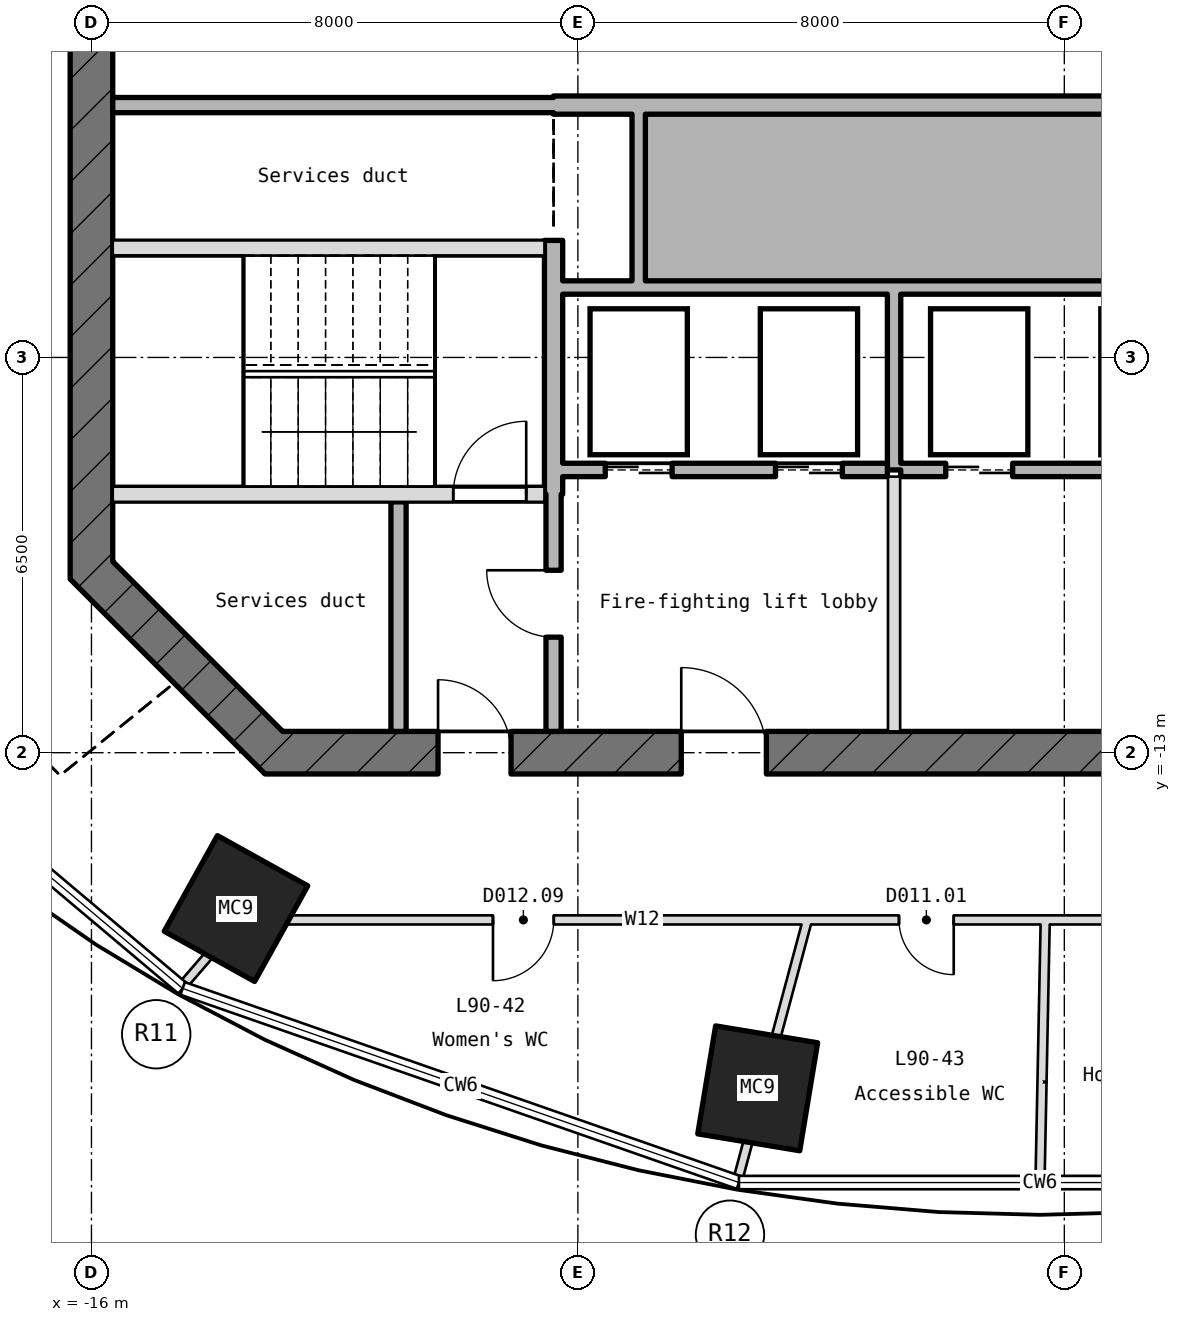
"""IFC4 building model, lengths in metres.
Left out: names, types, materials, properties, quantities, classifications, styles, units other than length and angle.
Written with IfcOpenShell. Run it as: python <this file> out.ifc"""

import sys

from ifc_helpers import new_model, si_unit, direction, frame, frame_2d, origin, origin_2d, place, context, subcontext, project, spatial, rectangle, hollow_rectangle, extrude, element, fill, save


model = new_model("IFC4")
c1 = context("Model", 3, precision=1e-05, world=origin(), true_north=direction((0.0, 1.0)))
c2 = subcontext(c1, "Body", "Model", "MODEL_VIEW")
j1 = project(units=[si_unit("LENGTHUNIT", "METRE"), si_unit("PLANEANGLEUNIT", "RADIAN")], contexts=[c1])
p1 = place(None, origin())
s1 = spatial("IfcSite", under=j1, at=p1, CompositionType="ELEMENT")
p2 = place(p1, origin())
s2 = spatial("IfcBuilding", under=s1, at=p2, CompositionType="ELEMENT")
p3 = place(p2, frame((0.0, 0.0, 396.55)))
s3 = spatial("IfcBuildingStorey", under=s2, at=p3, CompositionType="ELEMENT", Elevation=396.55)
for number, where, z_axis, x_axis in (
    (1, (-13.623, -15.563, -0.25), (0.0, 0.0, 1.0), (-0.874, 0.486, 0.0)),
    (2, (-5.043, -18.52, -0.25), (0.0, 0.0, 1.0), (-0.987, 0.163, 0.0)),
):
    element("IfcColumn", number, at=place(p3, frame(where, z_axis=z_axis, x_axis=x_axis)), inside=s3, PredefinedType="COLUMN", context=c2, shape_type="SweptSolid", body=[
        extrude(hollow_rectangle(XDim=1.7, YDim=1.8, WallThickness=0.05, at=origin_2d()), origin(), (0.0, 0.0, 1.0), 5.4),
    ])
p4 = place(p3, frame((-16.0, 10.145, -0.25), z_axis=(0.0, 0.0, 1.0), x_axis=(0.0, -1.0, 0.0)))
e3 = element("IfcWall", 3, at=p4, inside=s3, PredefinedType="SHEAR", context=c2, shape_type="SweptSolid", body=[
    extrude(rectangle(XDim=20.29, YDim=0.7, at=frame_2d((10.145, 0.0))), origin(), (0.0, 0.0, 1.0), 5.4),
])
p5 = place(p4, frame((8.945, 0.0, 0.25)))
e4 = element("IfcOpeningElement", 4, at=p5, cuts=e3, PredefinedType="OPENING", context=c2, shape_type="SweptSolid", body=[
    extrude(rectangle(XDim=2.4, YDim=2.1, at=frame_2d((1.2, 1.05))), frame((0.0, 0.36, 0.0), z_axis=(0.0, -1.0, 0.0), x_axis=(1.0, 0.0, 0.0)), (0.0, 0.0, 1.0), 0.72),
])
p6 = place(p4, frame((5.545, 0.0, 0.25)))
e5 = element("IfcOpeningElement", 5, at=p6, cuts=e3, PredefinedType="OPENING", context=c2, shape_type="SweptSolid", body=[
    extrude(rectangle(XDim=1.2, YDim=2.1, at=frame_2d((0.6, 1.05))), frame((0.0, 0.36, 0.0), z_axis=(0.0, -1.0, 0.0), x_axis=(1.0, 0.0, 0.0)), (0.0, 0.0, 1.0), 0.72),
])
p7 = place(p3, frame((-16.103, -9.897, -0.25), z_axis=(0.0, 0.0, 1.0), x_axis=(0.707106781187, -0.707106781187, 0.0)))
e6 = element("IfcWall", 6, at=p7, inside=s3, PredefinedType="SHEAR", context=c2, shape_type="SweptSolid", body=[
    extrude(rectangle(XDim=4.533, YDim=0.7, at=frame_2d((2.266, 0.0))), origin(), (0.0, 0.0, 1.0), 5.4),
])
p8 = place(p3, frame((-13.145, -13.0, -0.25), z_axis=(0.0, 0.0, 1.0), x_axis=(1.0, 0.0, 0.0)))
e7 = element("IfcWall", 7, at=p8, inside=s3, PredefinedType="SHEAR", context=c2, shape_type="SweptSolid", body=[
    extrude(rectangle(XDim=26.29, YDim=0.7, at=frame_2d((13.145, 0.0))), origin(), (0.0, 0.0, 1.0), 5.4),
])
p9 = place(p8, frame((2.845, 0.0, 0.25)))
e8 = element("IfcOpeningElement", 8, at=p9, cuts=e7, PredefinedType="OPENING", context=c2, shape_type="SweptSolid", body=[
    extrude(rectangle(XDim=1.2, YDim=2.1, at=frame_2d((0.6, 1.05))), frame((0.0, 0.36, 0.0), z_axis=(0.0, -1.0, 0.0), x_axis=(1.0, 0.0, 0.0)), (0.0, 0.0, 1.0), 0.72),
])
p10 = place(p8, frame((6.845, 0.0, 0.25)))
e9 = element("IfcOpeningElement", 9, at=p10, cuts=e7, PredefinedType="OPENING", context=c2, shape_type="SweptSolid", body=[
    extrude(rectangle(XDim=1.4, YDim=2.1, at=frame_2d((0.7, 1.05))), frame((0.0, 0.36, 0.0), z_axis=(0.0, -1.0, 0.0), x_axis=(1.0, 0.0, 0.0)), (0.0, 0.0, 1.0), 0.72),
])
p11 = place(p8, frame((15.445, 0.0, 0.25)))
e10 = element("IfcOpeningElement", 10, at=p11, cuts=e7, PredefinedType="OPENING", context=c2, shape_type="SweptSolid", body=[
    extrude(rectangle(XDim=1.4, YDim=2.1, at=frame_2d((0.7, 1.05))), frame((0.0, 0.36, 0.0), z_axis=(0.0, -1.0, 0.0), x_axis=(1.0, 0.0, 0.0)), (0.0, 0.0, 1.0), 0.72),
])
p12 = place(p3, frame((-15.65, -8.75, -0.25), z_axis=(0.0, 0.0, 1.0), x_axis=(1.0, 0.0, 0.0)))
e11 = element("IfcWall", 11, at=p12, inside=s3, PredefinedType="SHEAR", context=c2, shape_type="SweptSolid", body=[
    extrude(rectangle(XDim=7.1, YDim=0.25, at=frame_2d((3.55, 0.0))), origin(), (0.0, 0.0, 1.0), 5.4),
])
p13 = place(p12, frame((5.6, 0.0, 0.25)))
e12 = element("IfcOpeningElement", 12, at=p13, cuts=e11, PredefinedType="OPENING", context=c2, shape_type="SweptSolid", body=[
    extrude(rectangle(XDim=1.2, YDim=2.1, at=frame_2d((0.6, 1.05))), frame((0.0, 0.135, 0.0), z_axis=(0.0, -1.0, 0.0), x_axis=(1.0, 0.0, 0.0)), (0.0, 0.0, 1.0), 0.27),
])
p14 = place(p3, frame((-8.25, -8.35, 0.0), z_axis=(0.0, 0.0, 1.0), x_axis=(1.0, 0.0, 0.0)))
e13 = element("IfcWall", 13, at=p14, inside=s3, PredefinedType="STANDARD", context=c2, shape_type="SweptSolid", body=[
    extrude(rectangle(XDim=5.34, YDim=0.22, at=frame_2d((2.67, 0.0))), origin(), (0.0, 0.0, 1.0), 5.15),
])
p15 = place(p14, frame((0.7, 0.0, 0.0)))
e14 = element("IfcOpeningElement", 14, at=p15, cuts=e13, PredefinedType="OPENING", context=c2, shape_type="SweptSolid", body=[
    extrude(rectangle(XDim=1.1, YDim=2.1, at=frame_2d((0.55, 1.05))), frame((0.0, 0.12, 0.0), z_axis=(0.0, -1.0, 0.0), x_axis=(1.0, 0.0, 0.0)), (0.0, 0.0, 1.0), 0.24),
])
p16 = place(p14, frame((3.5, 0.0, 0.0)))
e15 = element("IfcOpeningElement", 15, at=p16, cuts=e13, PredefinedType="OPENING", context=c2, shape_type="SweptSolid", body=[
    extrude(rectangle(XDim=1.1, YDim=2.1, at=frame_2d((0.55, 1.05))), frame((0.0, 0.12, 0.0), z_axis=(0.0, -1.0, 0.0), x_axis=(1.0, 0.0, 0.0)), (0.0, 0.0, 1.0), 0.24),
])
p17 = place(p3, frame((-2.69, -8.35, 0.0), z_axis=(0.0, 0.0, 1.0), x_axis=(1.0, 0.0, 0.0)))
e16 = element("IfcWall", 16, at=p17, inside=s3, PredefinedType="STANDARD", context=c2, shape_type="SweptSolid", body=[
    extrude(rectangle(XDim=10.94, YDim=0.22, at=frame_2d((5.47, 0.0))), origin(), (0.0, 0.0, 1.0), 5.15),
])
p18 = place(p17, frame((0.74, 0.0, 0.0)))
e17 = element("IfcOpeningElement", 17, at=p18, cuts=e16, PredefinedType="OPENING", context=c2, shape_type="SweptSolid", body=[
    extrude(rectangle(XDim=1.1, YDim=2.1, at=frame_2d((0.55, 1.05))), frame((0.0, 0.12, 0.0), z_axis=(0.0, -1.0, 0.0), x_axis=(1.0, 0.0, 0.0)), (0.0, 0.0, 1.0), 0.24),
])
p19 = place(p17, frame((3.54, 0.0, 0.0)))
e18 = element("IfcOpeningElement", 18, at=p19, cuts=e16, PredefinedType="OPENING", context=c2, shape_type="SweptSolid", body=[
    extrude(rectangle(XDim=1.1, YDim=2.1, at=frame_2d((0.55, 1.05))), frame((0.0, 0.12, 0.0), z_axis=(0.0, -1.0, 0.0), x_axis=(1.0, 0.0, 0.0)), (0.0, 0.0, 1.0), 0.24),
])
p20 = place(p3, frame((-8.25, -5.35, 0.0), z_axis=(0.0, 0.0, 1.0), x_axis=(1.0, 0.0, 0.0)))
e19 = element("IfcWall", 19, at=p20, inside=s3, PredefinedType="STANDARD", context=c2, shape_type="SweptSolid", body=[
    extrude(rectangle(XDim=16.5, YDim=0.22, at=frame_2d((8.25, 0.0))), origin(), (0.0, 0.0, 1.0), 5.15),
])
p21 = place(p3, frame((-15.65, -4.7, -0.25), z_axis=(0.0, 0.0, 1.0), x_axis=(1.0, 0.0, 0.0)))
e20 = element("IfcWall", 20, at=p21, inside=s3, PredefinedType="SHEAR", context=c2, shape_type="SweptSolid", body=[
    extrude(rectangle(XDim=7.1, YDim=0.25, at=frame_2d((3.55, 0.0))), origin(), (0.0, 0.0, 1.0), 5.4),
])
p22 = place(p3, frame((-15.65, -2.35, 0.0), z_axis=(0.0, 0.0, 1.0), x_axis=(1.0, 0.0, 0.0)))
e21 = element("IfcWall", 21, at=p22, inside=s3, PredefinedType="STANDARD", context=c2, shape_type="SweptSolid", body=[
    extrude(rectangle(XDim=7.25, YDim=0.25, at=frame_2d((3.625, 0.0))), origin(), (0.0, 0.0, 1.0), 5.15),
])
p23 = place(p3, frame((-8.4, -2.35, -0.25), z_axis=(0.0, 0.0, 1.0), x_axis=(1.0, 0.0, 0.0)))
e22 = element("IfcWall", 22, at=p23, inside=s3, PredefinedType="SHEAR", context=c2, shape_type="SweptSolid", body=[
    extrude(rectangle(XDim=16.8, YDim=0.3, at=frame_2d((8.4, 0.0))), origin(), (0.0, 0.0, 1.0), 5.4),
])
p24 = place(p3, frame((-10.95, -12.65, 0.0), z_axis=(0.0, 0.0, 1.0), x_axis=(0.0, 1.0, 0.0)))
e23 = element("IfcWall", 23, at=p24, inside=s3, PredefinedType="STANDARD", context=c2, shape_type="SweptSolid", body=[
    extrude(rectangle(XDim=3.775, YDim=0.25, at=frame_2d((1.887, 0.0))), origin(), (0.0, 0.0, 1.0), 5.15),
])
p25 = place(p3, frame((-8.4, -12.65, 0.0), z_axis=(0.0, 0.0, 1.0), x_axis=(0.0, 1.0, 0.0)))
e24 = element("IfcWall", 24, at=p25, inside=s3, PredefinedType="STANDARD", context=c2, shape_type="SweptSolid", body=[
    extrude(rectangle(XDim=3.9, YDim=0.25, at=frame_2d((1.95, 0.0))), origin(), (0.0, 0.0, 1.0), 5.15),
])
p26 = place(p25, frame((1.55, 0.0, 0.0)))
e25 = element("IfcOpeningElement", 25, at=p26, cuts=e24, PredefinedType="OPENING", context=c2, shape_type="SweptSolid", body=[
    extrude(rectangle(XDim=1.1, YDim=2.1, at=frame_2d((0.55, 1.05))), frame((0.0, 0.135, 0.0), z_axis=(0.0, -1.0, 0.0), x_axis=(1.0, 0.0, 0.0)), (0.0, 0.0, 1.0), 0.27),
])
p27 = place(p3, frame((-8.4, -8.75, -0.25), z_axis=(0.0, 0.0, 1.0), x_axis=(0.0, 1.0, 0.0)))
e26 = element("IfcWall", 26, at=p27, inside=s3, PredefinedType="SHEAR", context=c2, shape_type="SweptSolid", body=[
    extrude(rectangle(XDim=4.175, YDim=0.3, at=frame_2d((2.087, 0.0))), origin(), (0.0, 0.0, 1.0), 5.4),
])
p28 = place(p3, frame((-7.0, -5.24, 0.0), z_axis=(0.0, 0.0, 1.0), x_axis=(0.0, 1.0, 0.0)))
e27 = element("IfcWall", 27, at=p28, inside=s3, PredefinedType="STANDARD", context=c2, shape_type="SweptSolid", body=[
    extrude(rectangle(XDim=2.74, YDim=0.22, at=frame_2d((1.37, 0.0))), origin(), (0.0, 0.0, 1.0), 5.15),
])
p29 = place(p3, frame((-2.8, -12.65, 0.0), z_axis=(0.0, 0.0, 1.0), x_axis=(0.0, 1.0, 0.0)))
e28 = element("IfcWall", 28, at=p29, inside=s3, PredefinedType="PARTITIONING", context=c2, shape_type="SweptSolid", body=[
    extrude(rectangle(XDim=4.19, YDim=0.2, at=frame_2d((2.095, 0.0))), origin(), (0.0, 0.0, 1.0), 5.15),
])
p30 = place(p3, frame((-2.8, -8.35, 0.0), z_axis=(0.0, 0.0, 1.0), x_axis=(0.0, 1.0, 0.0)))
e29 = element("IfcWall", 29, at=p30, inside=s3, PredefinedType="STANDARD", context=c2, shape_type="SweptSolid", body=[
    extrude(rectangle(XDim=2.89, YDim=0.22, at=frame_2d((1.445, 0.0))), origin(), (0.0, 0.0, 1.0), 5.15),
])
p31 = place(p3, frame((-0.319, -15.75, 0.0), z_axis=(0.0, 0.0, 1.0), x_axis=(1.0, 0.0, 0.0)))
e30 = element("IfcWall", 30, at=p31, inside=s3, PredefinedType="PARTITIONING", context=c2, shape_type="SweptSolid", body=[
    extrude(rectangle(XDim=15.326, YDim=0.15, at=frame_2d((7.663, 0.0))), origin(), (0.0, 0.0, 1.0), 5.15),
])
p32 = place(p31, frame((1.486, 0.0, 0.0)))
e31 = element("IfcOpeningElement", 31, at=p32, cuts=e30, PredefinedType="OPENING", context=c2, shape_type="SweptSolid", body=[
    extrude(rectangle(XDim=0.9, YDim=2.1, at=frame_2d((0.45, 1.05))), frame((0.0, 0.085, 0.0), z_axis=(0.0, -1.0, 0.0), x_axis=(1.0, 0.0, 0.0)), (0.0, 0.0, 1.0), 0.17),
])
p33 = place(p31, frame((8.663, 0.0, 0.0)))
e32 = element("IfcOpeningElement", 32, at=p33, cuts=e30, PredefinedType="OPENING", context=c2, shape_type="SweptSolid", body=[
    extrude(rectangle(XDim=1.0, YDim=2.1, at=frame_2d((0.5, 1.05))), frame((0.0, 0.085, 0.0), z_axis=(0.0, -1.0, 0.0), x_axis=(1.0, 0.0, 0.0)), (0.0, 0.0, 1.0), 0.17),
])
p34 = place(p3, frame((-13.569, -15.75, 0.0), z_axis=(0.0, 0.0, 1.0), x_axis=(1.0, 0.0, 0.0)))
e33 = element("IfcWall", 33, at=p34, inside=s3, PredefinedType="PARTITIONING", context=c2, shape_type="SweptSolid", body=[
    extrude(rectangle(XDim=13.26, YDim=0.15, at=frame_2d((6.63, 0.0))), origin(), (0.0, 0.0, 1.0), 5.15),
])
p35 = place(p34, frame((4.173, 0.0, 0.0)))
e34 = element("IfcOpeningElement", 34, at=p35, cuts=e33, PredefinedType="OPENING", context=c2, shape_type="SweptSolid", body=[
    extrude(rectangle(XDim=1.0, YDim=2.1, at=frame_2d((0.5, 1.05))), frame((0.0, 0.085, 0.0), z_axis=(0.0, -1.0, 0.0), x_axis=(1.0, 0.0, 0.0)), (0.0, 0.0, 1.0), 0.17),
])
p36 = place(p34, frame((10.85, 0.0, 0.0)))
e35 = element("IfcOpeningElement", 35, at=p36, cuts=e33, PredefinedType="OPENING", context=c2, shape_type="SweptSolid", body=[
    extrude(rectangle(XDim=0.9, YDim=2.1, at=frame_2d((0.45, 1.05))), frame((0.0, 0.085, 0.0), z_axis=(0.0, -1.0, 0.0), x_axis=(1.0, 0.0, 0.0)), (0.0, 0.0, 1.0), 0.17),
])
p37 = place(p3, frame((-14.51, -16.842, 0.0), z_axis=(0.0, 0.0, 1.0), x_axis=(0.652755375962, 0.757568755396, 0.0)))
e36 = element("IfcWall", 36, at=p37, inside=s3, PredefinedType="PARTITIONING", context=c2, shape_type="SweptSolid", body=[
    extrude(rectangle(XDim=1.442, YDim=0.15, at=frame_2d((0.721, 0.0))), origin(), (0.0, 0.0, 1.0), 5.15),
])
p38 = place(p3, frame((-5.375, -20.04, 0.0), z_axis=(0.0, 0.0, 1.0), x_axis=(0.259012288833, 0.965874026068, 0.0)))
e37 = element("IfcWall", 37, at=p38, inside=s3, PredefinedType="PARTITIONING", context=c2, shape_type="SweptSolid", body=[
    extrude(rectangle(XDim=1.959, YDim=0.15, at=frame_2d((0.979, 0.0))), origin(), (0.0, 0.0, 1.0), 5.15),
])
p39 = place(p3, frame((-4.867, -18.148, 0.0), z_axis=(0.0, 0.0, 1.0), x_axis=(0.258996568108, 0.965878241658, 0.0)))
e38 = element("IfcWall", 38, at=p39, inside=s3, PredefinedType="PARTITIONING", context=c2, shape_type="SweptSolid", body=[
    extrude(rectangle(XDim=2.483, YDim=0.15, at=frame_2d((1.241, 0.0))), origin(), (0.0, 0.0, 1.0), 4.797),
])
p40 = place(p3, frame((-0.4, -20.049, 0.0), z_axis=(0.0, 0.0, 1.0), x_axis=(0.02000495506, 0.999799880863, 0.0)))
e39 = element("IfcWall", 39, at=p40, inside=s3, PredefinedType="PARTITIONING", context=c2, shape_type="SweptSolid", body=[
    extrude(rectangle(XDim=1.635, YDim=0.15, at=frame_2d((0.818, 0.0))), origin(), (0.0, 0.0, 1.0), 5.15),
])
p41 = place(p3, frame((-0.367, -18.414, 0.0), z_axis=(0.0, 0.0, 1.0), x_axis=(0.019880611414, 0.999802361114, 0.0)))
e40 = element("IfcWall", 40, at=p41, inside=s3, PredefinedType="PARTITIONING", context=c2, shape_type="SweptSolid", body=[
    extrude(rectangle(XDim=2.665, YDim=0.15, at=frame_2d((1.333, 0.0))), origin(), (0.0, 0.0, 1.0), 4.84),
])
p42 = place(p15, origin())
e41 = element("IfcDoor", 41, at=p42, inside=s3, OperationType="DOUBLE_DOOR_SLIDING", PredefinedType="DOOR", context=c2, shape_type="SweptSolid", body=[
    extrude(rectangle(XDim=1.1, YDim=2.1, at=frame_2d((0.55, 1.05))), frame((0.0, 0.025, 0.0), z_axis=(0.0, -1.0, 0.0), x_axis=(1.0, 0.0, 0.0)), (0.0, 0.0, 1.0), 0.05),
])
fill(e14, e41)
p43 = place(p16, origin())
e42 = element("IfcDoor", 42, at=p43, inside=s3, OperationType="DOUBLE_DOOR_SLIDING", PredefinedType="DOOR", context=c2, shape_type="SweptSolid", body=[
    extrude(rectangle(XDim=1.1, YDim=2.1, at=frame_2d((0.55, 1.05))), frame((0.0, 0.025, 0.0), z_axis=(0.0, -1.0, 0.0), x_axis=(1.0, 0.0, 0.0)), (0.0, 0.0, 1.0), 0.05),
])
fill(e15, e42)
p44 = place(p18, origin())
e43 = element("IfcDoor", 43, at=p44, inside=s3, OperationType="DOUBLE_DOOR_SLIDING", PredefinedType="DOOR", context=c2, shape_type="SweptSolid", body=[
    extrude(rectangle(XDim=1.1, YDim=2.1, at=frame_2d((0.55, 1.05))), frame((0.0, 0.025, 0.0), z_axis=(0.0, -1.0, 0.0), x_axis=(1.0, 0.0, 0.0)), (0.0, 0.0, 1.0), 0.05),
])
fill(e17, e43)
p45 = place(p13, origin())
e44 = element("IfcDoor", 44, at=p45, inside=s3, OperationType="SINGLE_SWING_RIGHT", PredefinedType="DOOR", context=c2, shape_type="SweptSolid", body=[
    extrude(rectangle(XDim=1.2, YDim=2.1, at=frame_2d((0.6, 1.05))), frame((0.0, 0.025, 0.0), z_axis=(0.0, -1.0, 0.0), x_axis=(1.0, 0.0, 0.0)), (0.0, 0.0, 1.0), 0.05),
])
fill(e12, e44)
p46 = place(p26, origin())
e45 = element("IfcDoor", 45, at=p46, inside=s3, OperationType="SINGLE_SWING_RIGHT", PredefinedType="DOOR", context=c2, shape_type="SweptSolid", body=[
    extrude(rectangle(XDim=1.1, YDim=2.1, at=frame_2d((0.55, 1.05))), frame((0.0, 0.025, 0.0), z_axis=(0.0, -1.0, 0.0), x_axis=(1.0, 0.0, 0.0)), (0.0, 0.0, 1.0), 0.05),
])
fill(e25, e45)
p47 = place(p9, origin())
e46 = element("IfcDoor", 46, at=p47, inside=s3, OperationType="SINGLE_SWING_RIGHT", PredefinedType="DOOR", context=c2, shape_type="SweptSolid", body=[
    extrude(rectangle(XDim=1.2, YDim=2.1, at=frame_2d((0.6, 1.05))), frame((0.0, 0.025, 0.0), z_axis=(0.0, -1.0, 0.0), x_axis=(1.0, 0.0, 0.0)), (0.0, 0.0, 1.0), 0.05),
])
fill(e8, e46)
p48 = place(p10, origin())
e47 = element("IfcDoor", 47, at=p48, inside=s3, OperationType="SINGLE_SWING_RIGHT", PredefinedType="DOOR", context=c2, shape_type="SweptSolid", body=[
    extrude(rectangle(XDim=1.4, YDim=2.1, at=frame_2d((0.7, 1.05))), frame((0.0, 0.025, 0.0), z_axis=(0.0, -1.0, 0.0), x_axis=(1.0, 0.0, 0.0)), (0.0, 0.0, 1.0), 0.05),
])
fill(e9, e47)
p49 = place(p35, frame((1.0, 0.0, 0.0), z_axis=(0.0, 0.0, 1.0), x_axis=(-1.0, 0.0, 0.0)))
e48 = element("IfcDoor", 48, at=p49, inside=s3, OperationType="SINGLE_SWING_LEFT", PredefinedType="DOOR", context=c2, shape_type="SweptSolid", body=[
    extrude(rectangle(XDim=1.0, YDim=2.1, at=frame_2d((0.5, 1.05))), frame((0.0, 0.025, 0.0), z_axis=(0.0, -1.0, 0.0), x_axis=(1.0, 0.0, 0.0)), (0.0, 0.0, 1.0), 0.05),
])
fill(e34, e48)
p50 = place(p36, frame((0.9, 0.0, 0.0), z_axis=(0.0, 0.0, 1.0), x_axis=(-1.0, 0.0, 0.0)))
e49 = element("IfcDoor", 49, at=p50, inside=s3, OperationType="SINGLE_SWING_LEFT", PredefinedType="DOOR", context=c2, shape_type="SweptSolid", body=[
    extrude(rectangle(XDim=0.9, YDim=2.1, at=frame_2d((0.45, 1.05))), frame((0.0, 0.025, 0.0), z_axis=(0.0, -1.0, 0.0), x_axis=(1.0, 0.0, 0.0)), (0.0, 0.0, 1.0), 0.05),
])
fill(e35, e49)
save(model, sys.argv[1])
